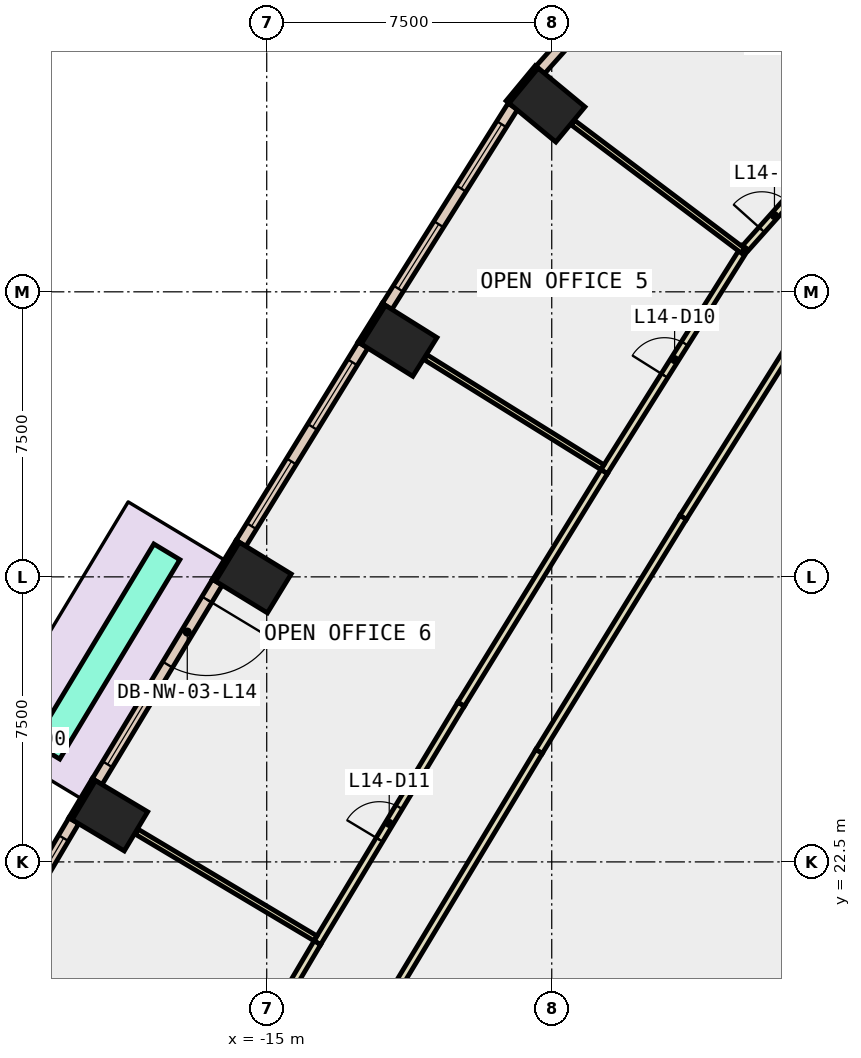
"""IFC4 building model, lengths in metres.
Left out: names, types, materials, properties, quantities, classifications, styles, units other than length and angle.
Written with IfcOpenShell. Run it as: python <this file> out.ifc"""

import sys

from ifc_helpers import new_model, si_unit, direction, frame, frame_2d, origin, origin_2d, place, context, subcontext, project, spatial, rectangle, extrude, element, fill, save


model = new_model("IFC4")
c1 = context("Model", 3, precision=1e-05, world=origin(), true_north=direction((0.0, 1.0)))
c2 = subcontext(c1, "Body", "Model", "MODEL_VIEW")
j1 = project(units=[si_unit("LENGTHUNIT", "METRE"), si_unit("PLANEANGLEUNIT", "RADIAN")], contexts=[c1])
p1 = place(None, origin())
s1 = spatial("IfcSite", under=j1, at=p1, CompositionType="ELEMENT")
p2 = place(p1, origin())
s2 = spatial("IfcBuilding", under=s1, at=p2, CompositionType="ELEMENT")
p3 = place(p2, frame((0.0, 0.0, 68.6)))
s3 = spatial("IfcBuildingStorey", under=s2, at=p3, CompositionType="ELEMENT", Elevation=68.6)
for number, where, z_axis, x_axis in (
    (1, (-7.625, 42.414, -0.4), (0.0, 0.0, 1.0), (0.638, 0.77, 0.0)),
    (2, (-11.516, 36.211, -0.4), (0.0, 0.0, 1.0), (0.53, 0.848, 0.0)),
    (3, (-15.351, 29.981, -0.4), (0.0, 0.0, 1.0), (0.522, 0.853, 0.0)),
    (4, (-19.127, 23.714, -0.4), (0.0, 0.0, 1.0), (0.513, 0.858, 0.0)),
):
    element("IfcColumn", number, at=place(p3, frame(where, z_axis=z_axis, x_axis=x_axis)), inside=s3, PredefinedType="COLUMN", context=c2, shape_type="SweptSolid", body=[
        extrude(rectangle(XDim=1.2, YDim=1.6, at=origin_2d()), origin(), (0.0, 0.0, 1.0), 4.2),
    ])
p4 = place(p3, frame((-7.897, 43.418, 0.0), z_axis=(0.0, 0.0, 1.0), x_axis=(-0.637759271497, -0.770235750676, 0.0)))
e5 = element("IfcWall", 5, at=p4, inside=s3, PredefinedType="STANDARD", context=c2, shape_type="SweptSolid", body=[
    extrude(rectangle(XDim=1.2, YDim=0.1, at=frame_2d((0.6, 0.0))), origin(), (0.0, 0.0, 1.0), 3.8),
])
p5 = place(p3, frame((-11.919, 37.17, 0.0), z_axis=(0.0, 0.0, 1.0), x_axis=(-0.530273374944, -0.847826720401, 0.0)))
e6 = element("IfcWall", 6, at=p5, inside=s3, PredefinedType="STANDARD", context=c2, shape_type="SweptSolid", body=[
    extrude(rectangle(XDim=1.199, YDim=0.1, at=frame_2d((0.6, 0.0))), origin(), (0.0, 0.0, 1.0), 3.8),
])
for number, where, z_axis, x_axis in (
    (7, (-15.763, 30.936, 0.0), (0.0, 0.0, 1.0), (-0.522, -0.853, 0.0)),
    (8, (-19.549, 24.665, 0.0), (0.0, 0.0, 1.0), (-0.513, -0.858, 0.0)),
):
    element("IfcWall", number, at=place(p3, frame(where, z_axis=z_axis, x_axis=x_axis)), inside=s3, PredefinedType="STANDARD", context=c2, shape_type="SweptSolid", body=[
        extrude(rectangle(XDim=1.2, YDim=0.1, at=frame_2d((0.6, 0.0))), origin(), (0.0, 0.0, 1.0), 3.8),
    ])
p6 = place(p3, frame((-5.358, 46.071, 0.0), z_axis=(0.0, 0.0, 1.0), x_axis=(-0.666901909312, -0.745145518242, 0.0)))
e9 = element("IfcWall", 9, at=p6, inside=s3, PredefinedType="STANDARD", context=c2, shape_type="SweptSolid", body=[
    extrude(rectangle(XDim=3.666, YDim=0.3, at=frame_2d((1.833, 0.0))), origin(), (0.0, 0.0, 1.0), 3.8),
])
p7 = place(p6, frame((1.133, 0.0, 0.9)))
e10 = element("IfcOpeningElement", 10, at=p7, cuts=e9, PredefinedType="OPENING", context=c2, shape_type="SweptSolid", body=[
    extrude(rectangle(XDim=1.4, YDim=2.6, at=frame_2d((0.7, 1.3))), frame((0.0, 0.16, 0.0), z_axis=(0.0, -1.0, 0.0), x_axis=(1.0, 0.0, 0.0)), (0.0, 0.0, 1.0), 0.32),
])
p8 = place(p3, frame((-8.523, 42.38, 0.0), z_axis=(0.0, 0.0, 1.0), x_axis=(-0.532322705893, -0.846541515102, 0.0)))
e11 = element("IfcWall", 11, at=p8, inside=s3, PredefinedType="STANDARD", context=c2, shape_type="SweptSolid", body=[
    extrude(rectangle(XDim=6.218, YDim=0.3, at=frame_2d((3.109, 0.0))), origin(), (0.0, 0.0, 1.0), 3.8),
])
p9 = place(p8, frame((0.555, 0.0, 0.9)))
e12 = element("IfcOpeningElement", 12, at=p9, cuts=e11, PredefinedType="OPENING", context=c2, shape_type="SweptSolid", body=[
    extrude(rectangle(XDim=2.0, YDim=2.6, at=frame_2d((1.0, 1.3))), frame((0.0, 0.16, 0.0), z_axis=(0.0, -1.0, 0.0), x_axis=(1.0, 0.0, 0.0)), (0.0, 0.0, 1.0), 0.32),
])
p10 = place(p8, frame((3.664, 0.0, 0.9)))
e13 = element("IfcOpeningElement", 13, at=p10, cuts=e11, PredefinedType="OPENING", context=c2, shape_type="SweptSolid", body=[
    extrude(rectangle(XDim=2.0, YDim=2.6, at=frame_2d((1.0, 1.3))), frame((0.0, 0.16, 0.0), z_axis=(0.0, -1.0, 0.0), x_axis=(1.0, 0.0, 0.0)), (0.0, 0.0, 1.0), 0.32),
])
p11 = place(p3, frame((-12.466, 36.098, 0.0), z_axis=(0.0, 0.0, 1.0), x_axis=(-0.524239751329, -0.851570715282, 0.0)))
e14 = element("IfcWall", 14, at=p11, inside=s3, PredefinedType="STANDARD", context=c2, shape_type="SweptSolid", body=[
    extrude(rectangle(XDim=6.125, YDim=0.3, at=frame_2d((3.062, 0.0))), origin(), (0.0, 0.0, 1.0), 3.8),
])
p12 = place(p11, frame((0.531, 0.0, 0.9)))
e15 = element("IfcOpeningElement", 15, at=p12, cuts=e14, PredefinedType="OPENING", context=c2, shape_type="SweptSolid", body=[
    extrude(rectangle(XDim=2.0, YDim=2.6, at=frame_2d((1.0, 1.3))), frame((0.0, 0.16, 0.0), z_axis=(0.0, -1.0, 0.0), x_axis=(1.0, 0.0, 0.0)), (0.0, 0.0, 1.0), 0.32),
])
p13 = place(p11, frame((3.594, 0.0, 0.9)))
e16 = element("IfcOpeningElement", 16, at=p13, cuts=e14, PredefinedType="OPENING", context=c2, shape_type="SweptSolid", body=[
    extrude(rectangle(XDim=2.0, YDim=2.6, at=frame_2d((1.0, 1.3))), frame((0.0, 0.16, 0.0), z_axis=(0.0, -1.0, 0.0), x_axis=(1.0, 0.0, 0.0)), (0.0, 0.0, 1.0), 0.32),
])
p14 = place(p3, frame((-16.3, 29.859, 0.0), z_axis=(0.0, 0.0, 1.0), x_axis=(-0.516147563478, -0.856499674674, 0.0)))
e17 = element("IfcWall", 17, at=p14, inside=s3, PredefinedType="STANDARD", context=c2, shape_type="SweptSolid", body=[
    extrude(rectangle(XDim=6.126, YDim=0.3, at=frame_2d((3.063, 0.0))), origin(), (0.0, 0.0, 1.0), 3.8),
])
p15 = place(p14, frame((0.532, 0.0, 0.0)))
e18 = element("IfcOpeningElement", 18, at=p15, cuts=e17, PredefinedType="OPENING", context=c2, shape_type="SweptSolid", body=[
    extrude(rectangle(XDim=2.0, YDim=2.4, at=frame_2d((1.0, 1.2))), frame((0.0, 0.16, 0.0), z_axis=(0.0, -1.0, 0.0), x_axis=(1.0, 0.0, 0.0)), (0.0, 0.0, 1.0), 0.32),
])
p16 = place(p14, frame((3.595, 0.0, 0.9)))
e19 = element("IfcOpeningElement", 19, at=p16, cuts=e17, PredefinedType="OPENING", context=c2, shape_type="SweptSolid", body=[
    extrude(rectangle(XDim=2.0, YDim=2.6, at=frame_2d((1.0, 1.3))), frame((0.0, 0.16, 0.0), z_axis=(0.0, -1.0, 0.0), x_axis=(1.0, 0.0, 0.0)), (0.0, 0.0, 1.0), 0.32),
])
p17 = place(p3, frame((-20.076, 23.583, 0.0), z_axis=(0.0, 0.0, 1.0), x_axis=(-0.508163938648, -0.861260362177, 0.0)))
e20 = element("IfcWall", 20, at=p17, inside=s3, PredefinedType="STANDARD", context=c2, shape_type="SweptSolid", body=[
    extrude(rectangle(XDim=6.126, YDim=0.3, at=frame_2d((3.063, 0.0))), origin(), (0.0, 0.0, 1.0), 3.8),
])
p18 = place(p17, frame((0.531, 0.0, 0.9)))
e21 = element("IfcOpeningElement", 21, at=p18, cuts=e20, PredefinedType="OPENING", context=c2, shape_type="SweptSolid", body=[
    extrude(rectangle(XDim=2.0, YDim=2.6, at=frame_2d((1.0, 1.3))), frame((0.0, 0.16, 0.0), z_axis=(0.0, -1.0, 0.0), x_axis=(1.0, 0.0, 0.0)), (0.0, 0.0, 1.0), 0.32),
])
p19 = place(p17, frame((3.594, 0.0, 0.9)))
e22 = element("IfcOpeningElement", 22, at=p19, cuts=e20, PredefinedType="OPENING", context=c2, shape_type="SweptSolid", body=[
    extrude(rectangle(XDim=2.0, YDim=2.6, at=frame_2d((1.0, 1.3))), frame((0.0, 0.16, 0.0), z_axis=(0.0, -1.0, 0.0), x_axis=(1.0, 0.0, 0.0)), (0.0, 0.0, 1.0), 0.32),
])
p20 = place(p3, frame((-17.628, 30.659, 0.0), z_axis=(0.0, 0.0, 1.0), x_axis=(-0.516130324979, -0.856510062776, 0.0)))
e23 = element("IfcWall", 23, at=p20, inside=s3, PredefinedType="STANDARD", context=c2, shape_type="SweptSolid", body=[
    extrude(rectangle(XDim=6.125, YDim=0.8, at=frame_2d((3.062, 0.0))), origin(), (0.0, 0.0, 1.0), 0.8),
])
p21 = place(p3, frame((-0.489, 37.216, 0.0), z_axis=(0.0, 0.0, 1.0), x_axis=(-0.532301094997, -0.846555104092, 0.0)))
e24 = element("IfcWall", 24, at=p21, inside=s3, PredefinedType="PARTITIONING", context=c2, shape_type="SweptSolid", body=[
    extrude(rectangle(XDim=6.677, YDim=0.2, at=frame_2d((3.338, 0.0))), origin(), (0.0, 0.0, 1.0), 3.8),
])
p22 = place(p3, frame((-4.043, 31.564, 0.0), z_axis=(0.0, 0.0, 1.0), x_axis=(-0.524225471951, -0.851579505717, 0.0)))
e25 = element("IfcWall", 25, at=p22, inside=s3, PredefinedType="PARTITIONING", context=c2, shape_type="SweptSolid", body=[
    extrude(rectangle(XDim=7.233, YDim=0.2, at=frame_2d((3.617, 0.0))), origin(), (0.0, 0.0, 1.0), 3.8),
])
p23 = place(p3, frame((-7.835, 25.404, 0.0), z_axis=(0.0, 0.0, 1.0), x_axis=(-0.516172233954, -0.85648480716, 0.0)))
e26 = element("IfcWall", 26, at=p23, inside=s3, PredefinedType="PARTITIONING", context=c2, shape_type="SweptSolid", body=[
    extrude(rectangle(XDim=7.234, YDim=0.2, at=frame_2d((3.617, 0.0))), origin(), (0.0, 0.0, 1.0), 3.8),
])
p24 = place(p3, frame((-2.4, 38.655, 0.0), z_axis=(0.0, 0.0, 1.0), x_axis=(0.666791730919, 0.745244112743, 0.0)))
e27 = element("IfcWall", 27, at=p24, inside=s3, PredefinedType="PARTITIONING", context=c2, shape_type="SweptSolid", body=[
    extrude(rectangle(XDim=2.281, YDim=0.2, at=frame_2d((1.141, 0.0))), origin(), (0.0, 0.0, 1.0), 3.8),
])
p25 = place(p24, frame((0.641, 0.0, 0.0)))
e28 = element("IfcOpeningElement", 28, at=p25, cuts=e27, PredefinedType="OPENING", context=c2, shape_type="SweptSolid", body=[
    extrude(rectangle(XDim=1.0, YDim=2.1, at=frame_2d((0.5, 1.05))), frame((0.0, 0.11, 0.0), z_axis=(0.0, -1.0, 0.0), x_axis=(1.0, 0.0, 0.0)), (0.0, 0.0, 1.0), 0.22),
])
p26 = place(p3, frame((-6.121, 32.768, 0.0), z_axis=(0.0, 0.0, 1.0), x_axis=(0.532309351336, 0.846549912574, 0.0)))
e29 = element("IfcWall", 29, at=p26, inside=s3, PredefinedType="PARTITIONING", context=c2, shape_type="SweptSolid", body=[
    extrude(rectangle(XDim=6.966, YDim=0.2, at=frame_2d((3.483, 0.0))), origin(), (0.0, 0.0, 1.0), 3.8),
])
p27 = place(p26, frame((2.983, 0.0, 0.0)))
e30 = element("IfcOpeningElement", 30, at=p27, cuts=e29, PredefinedType="OPENING", context=c2, shape_type="SweptSolid", body=[
    extrude(rectangle(XDim=1.0, YDim=2.1, at=frame_2d((0.5, 1.05))), frame((0.0, 0.11, 0.0), z_axis=(0.0, -1.0, 0.0), x_axis=(1.0, 0.0, 0.0)), (0.0, 0.0, 1.0), 0.22),
])
p28 = place(p3, frame((-13.669, 20.373, 0.0), z_axis=(0.0, 0.0, 1.0), x_axis=(0.516247820136, 0.85643924957, 0.0)))
e31 = element("IfcWall", 31, at=p28, inside=s3, PredefinedType="PARTITIONING", context=c2, shape_type="SweptSolid", body=[
    extrude(rectangle(XDim=7.332, YDim=0.2, at=frame_2d((3.666, 0.0))), origin(), (0.0, 0.0, 1.0), 3.8),
])
p29 = place(p28, frame((3.166, 0.0, 0.0)))
e32 = element("IfcOpeningElement", 32, at=p29, cuts=e31, PredefinedType="OPENING", context=c2, shape_type="SweptSolid", body=[
    extrude(rectangle(XDim=1.0, YDim=2.1, at=frame_2d((0.5, 1.05))), frame((0.0, 0.11, 0.0), z_axis=(0.0, -1.0, 0.0), x_axis=(1.0, 0.0, 0.0)), (0.0, 0.0, 1.0), 0.22),
])
p30 = place(p3, frame((-9.884, 26.652, 0.0), z_axis=(0.0, 0.0, 1.0), x_axis=(0.524182788618, 0.851605779758, 0.0)))
e33 = element("IfcWall", 33, at=p30, inside=s3, PredefinedType="PARTITIONING", context=c2, shape_type="SweptSolid", body=[
    extrude(rectangle(XDim=7.18, YDim=0.2, at=frame_2d((3.59, 0.0))), origin(), (0.0, 0.0, 1.0), 3.8),
])
p31 = place(p3, frame((-17.357, 14.122, 0.0), z_axis=(0.0, 0.0, 1.0), x_axis=(0.508298575594, 0.861180909014, 0.0)))
e34 = element("IfcWall", 34, at=p31, inside=s3, PredefinedType="PARTITIONING", context=c2, shape_type="SweptSolid", body=[
    extrude(rectangle(XDim=7.258, YDim=0.2, at=frame_2d((3.629, 0.0))), origin(), (0.0, 0.0, 1.0), 3.8),
])
p32 = place(p31, frame((3.204, 0.0, 0.0)))
e35 = element("IfcOpeningElement", 35, at=p32, cuts=e34, PredefinedType="OPENING", context=c2, shape_type="SweptSolid", body=[
    extrude(rectangle(XDim=1.0, YDim=2.1, at=frame_2d((0.5, 1.05))), frame((0.0, 0.11, 0.0), z_axis=(0.0, -1.0, 0.0), x_axis=(1.0, 0.0, 0.0)), (0.0, 0.0, 1.0), 0.22),
])
p33 = place(p3, frame((-2.466, 38.58, 0.0), z_axis=(0.0, 0.0, 1.0), x_axis=(-0.798796148738, 0.601601789193, 0.0)))
e36 = element("IfcWall", 36, at=p33, inside=s3, PredefinedType="PARTITIONING", context=c2, shape_type="SweptSolid", body=[
    extrude(rectangle(XDim=5.605, YDim=0.15, at=frame_2d((2.802, 0.0))), origin(), (0.0, 0.0, 1.0), 3.8),
])
p34 = place(p3, frame((-6.166, 32.885, 0.0), z_axis=(0.0, 0.0, 1.0), x_axis=(-0.84915518202, 0.528143424506, 0.0)))
e37 = element("IfcWall", 37, at=p34, inside=s3, PredefinedType="PARTITIONING", context=c2, shape_type="SweptSolid", body=[
    extrude(rectangle(XDim=5.48, YDim=0.15, at=frame_2d((2.74, 0.0))), origin(), (0.0, 0.0, 1.0), 3.8),
])
p35 = place(p3, frame((-13.716, 20.488, 0.0), z_axis=(0.0, 0.0, 1.0), x_axis=(-0.85883841868, 0.512246591594, 0.0)))
e38 = element("IfcWall", 38, at=p35, inside=s3, PredefinedType="PARTITIONING", context=c2, shape_type="SweptSolid", body=[
    extrude(rectangle(XDim=5.479, YDim=0.15, at=frame_2d((2.74, 0.0))), origin(), (0.0, 0.0, 1.0), 3.8),
])
p36 = place(p9, origin())
e39 = element("IfcWindow", 39, at=p36, inside=s3, PartitioningType="SINGLE_PANEL", PredefinedType="WINDOW", context=c2, shape_type="SweptSolid", body=[
    extrude(rectangle(XDim=2.0, YDim=2.6, at=frame_2d((1.0, 1.3))), frame((0.0, 0.03, 0.0), z_axis=(0.0, -1.0, 0.0), x_axis=(1.0, 0.0, 0.0)), (0.0, 0.0, 1.0), 0.06),
])
fill(e12, e39)
p37 = place(p10, origin())
e40 = element("IfcWindow", 40, at=p37, inside=s3, PartitioningType="SINGLE_PANEL", PredefinedType="WINDOW", context=c2, shape_type="SweptSolid", body=[
    extrude(rectangle(XDim=2.0, YDim=2.6, at=frame_2d((1.0, 1.3))), frame((0.0, 0.03, 0.0), z_axis=(0.0, -1.0, 0.0), x_axis=(1.0, 0.0, 0.0)), (0.0, 0.0, 1.0), 0.06),
])
fill(e13, e40)
p38 = place(p12, origin())
e41 = element("IfcWindow", 41, at=p38, inside=s3, PartitioningType="SINGLE_PANEL", PredefinedType="WINDOW", context=c2, shape_type="SweptSolid", body=[
    extrude(rectangle(XDim=2.0, YDim=2.6, at=frame_2d((1.0, 1.3))), frame((0.0, 0.03, 0.0), z_axis=(0.0, -1.0, 0.0), x_axis=(1.0, 0.0, 0.0)), (0.0, 0.0, 1.0), 0.06),
])
fill(e15, e41)
p39 = place(p13, origin())
e42 = element("IfcWindow", 42, at=p39, inside=s3, PartitioningType="SINGLE_PANEL", PredefinedType="WINDOW", context=c2, shape_type="SweptSolid", body=[
    extrude(rectangle(XDim=2.0, YDim=2.6, at=frame_2d((1.0, 1.3))), frame((0.0, 0.03, 0.0), z_axis=(0.0, -1.0, 0.0), x_axis=(1.0, 0.0, 0.0)), (0.0, 0.0, 1.0), 0.06),
])
fill(e16, e42)
p40 = place(p15, origin())
e43 = element("IfcDoor", 43, at=p40, inside=s3, OperationType="SLIDING_TO_LEFT", PredefinedType="DOOR", context=c2, shape_type="SweptSolid", body=[
    extrude(rectangle(XDim=2.0, YDim=2.4, at=frame_2d((1.0, 1.2))), frame((0.0, 0.025, 0.0), z_axis=(0.0, -1.0, 0.0), x_axis=(1.0, 0.0, 0.0)), (0.0, 0.0, 1.0), 0.05),
])
fill(e18, e43)
p41 = place(p16, origin())
e44 = element("IfcWindow", 44, at=p41, inside=s3, PartitioningType="SINGLE_PANEL", PredefinedType="WINDOW", context=c2, shape_type="SweptSolid", body=[
    extrude(rectangle(XDim=2.0, YDim=2.6, at=frame_2d((1.0, 1.3))), frame((0.0, 0.03, 0.0), z_axis=(0.0, -1.0, 0.0), x_axis=(1.0, 0.0, 0.0)), (0.0, 0.0, 1.0), 0.06),
])
fill(e19, e44)
p42 = place(p18, origin())
e45 = element("IfcWindow", 45, at=p42, inside=s3, PartitioningType="SINGLE_PANEL", PredefinedType="WINDOW", context=c2, shape_type="SweptSolid", body=[
    extrude(rectangle(XDim=2.0, YDim=2.6, at=frame_2d((1.0, 1.3))), frame((0.0, 0.03, 0.0), z_axis=(0.0, -1.0, 0.0), x_axis=(1.0, 0.0, 0.0)), (0.0, 0.0, 1.0), 0.06),
])
fill(e21, e45)
p43 = place(p25, origin())
e46 = element("IfcDoor", 46, at=p43, inside=s3, OperationType="SINGLE_SWING_LEFT", PredefinedType="DOOR", context=c2, shape_type="SweptSolid", body=[
    extrude(rectangle(XDim=1.0, YDim=2.1, at=frame_2d((0.5, 1.05))), frame((0.0, 0.025, 0.0), z_axis=(0.0, -1.0, 0.0), x_axis=(1.0, 0.0, 0.0)), (0.0, 0.0, 1.0), 0.05),
])
fill(e28, e46)
p44 = place(p27, origin())
e47 = element("IfcDoor", 47, at=p44, inside=s3, OperationType="SINGLE_SWING_LEFT", PredefinedType="DOOR", context=c2, shape_type="SweptSolid", body=[
    extrude(rectangle(XDim=1.0, YDim=2.1, at=frame_2d((0.5, 1.05))), frame((0.0, 0.025, 0.0), z_axis=(0.0, -1.0, 0.0), x_axis=(1.0, 0.0, 0.0)), (0.0, 0.0, 1.0), 0.05),
])
fill(e30, e47)
p45 = place(p29, origin())
e48 = element("IfcDoor", 48, at=p45, inside=s3, OperationType="SINGLE_SWING_LEFT", PredefinedType="DOOR", context=c2, shape_type="SweptSolid", body=[
    extrude(rectangle(XDim=1.0, YDim=2.1, at=frame_2d((0.5, 1.05))), frame((0.0, 0.025, 0.0), z_axis=(0.0, -1.0, 0.0), x_axis=(1.0, 0.0, 0.0)), (0.0, 0.0, 1.0), 0.05),
])
fill(e32, e48)
save(model, sys.argv[1])
